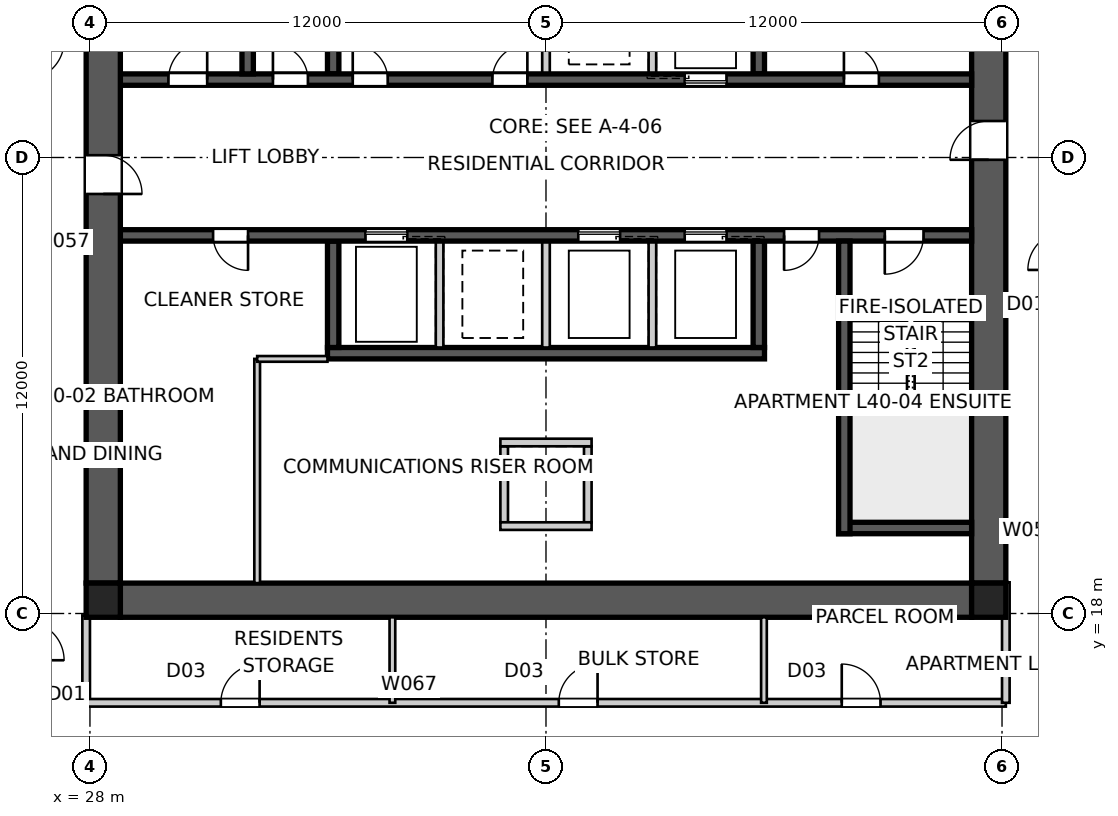
"""IFC4 building model, lengths in metres.
Left out: names, types, materials, properties, quantities, classifications, styles, units other than length and angle.
Written with IfcOpenShell. Run it as: python <this file> out.ifc"""

import sys

from ifc_helpers import new_model, si_unit, direction, frame, frame_2d, origin, origin_2d, place, context, subcontext, project, spatial, polyline, rectangle, outline, extrude, element, fill, save


model = new_model("IFC4")
c1 = context("Model", 3, precision=1e-05, world=origin(), true_north=direction((0.0, 1.0)))
c2 = subcontext(c1, "Body", "Model", "MODEL_VIEW")
j1 = project(units=[si_unit("LENGTHUNIT", "METRE"), si_unit("PLANEANGLEUNIT", "RADIAN")], contexts=[c1])
p1 = place(None, origin())
s1 = spatial("IfcSite", under=j1, at=p1, CompositionType="ELEMENT")
p2 = place(p1, origin())
s2 = spatial("IfcBuilding", under=s1, at=p2, CompositionType="ELEMENT")
p3 = place(p2, frame((0.0, 0.0, 147.2)))
s3 = spatial("IfcBuildingStorey", under=s2, at=p3, CompositionType="ELEMENT", Elevation=147.2)
p4 = place(p3, frame((51.2, 18.35, 0.0), z_axis=(0.0, 0.0, 1.0), x_axis=(-1.0, 0.0, 0.0)))
e1 = element("IfcWall", 1, at=p4, inside=s3, PredefinedType="SHEAR", context=c2, shape_type="SweptSolid", body=[
    extrude(outline(polyline([(0.0, -0.45), (22.4, -0.45), (22.4, -0.025), (22.85, -0.025), (22.85, 0.025), (22.4, 0.025), (22.4, 0.45), (0.0, 0.45), (0.0, 0.025), (-0.45, 0.025), (-0.45, -0.025), (0.0, -0.025), (0.0, -0.45)])), origin(), (0.0, 0.0, 1.0), 3.4),
])
p5 = place(p3, frame((51.65, 18.8, 0.0), z_axis=(0.0, 0.0, 1.0), x_axis=(0.0, 1.0, 0.0)))
e2 = element("IfcWall", 2, at=p5, inside=s3, PredefinedType="SHEAR", context=c2, shape_type="SweptSolid", body=[
    extrude(outline(polyline([(0.0, -0.45), (22.4, -0.45), (22.4, -0.025), (22.85, -0.025), (22.85, 0.025), (22.4, 0.025), (22.4, 0.45), (0.0, 0.45), (0.0, 0.025), (-0.45, 0.025), (-0.45, -0.025), (0.0, -0.025), (0.0, -0.45)])), origin(), (0.0, 0.0, 1.0), 3.4),
])
p6 = place(p5, frame((11.14, 0.0, 0.0)))
e3 = element("IfcOpeningElement", 3, at=p6, cuts=e2, PredefinedType="OPENING", context=c2, shape_type="SweptSolid", body=[
    extrude(rectangle(XDim=1.02, YDim=2.4, at=frame_2d((0.51, 1.2))), frame((0.0, 0.46, 0.0), z_axis=(0.0, -1.0, 0.0), x_axis=(1.0, 0.0, 0.0)), (0.0, 0.0, 1.0), 0.92),
])
p7 = place(p3, frame((28.35, 41.2, 0.0), z_axis=(0.0, 0.0, 1.0), x_axis=(0.0, -1.0, 0.0)))
e4 = element("IfcWall", 4, at=p7, inside=s3, PredefinedType="SHEAR", context=c2, shape_type="SweptSolid", body=[
    extrude(outline(polyline([(0.0, -0.45), (22.4, -0.45), (22.4, -0.025), (22.85, -0.025), (22.85, 0.025), (22.4, 0.025), (22.4, 0.45), (0.0, 0.45), (0.0, 0.025), (-0.45, 0.025), (-0.45, -0.025), (0.0, -0.025), (0.0, -0.45)])), origin(), (0.0, 0.0, 1.0), 3.4),
])
p8 = place(p7, frame((11.14, 0.0, 0.0)))
e5 = element("IfcOpeningElement", 5, at=p8, cuts=e4, PredefinedType="OPENING", context=c2, shape_type="SweptSolid", body=[
    extrude(rectangle(XDim=1.02, YDim=2.4, at=frame_2d((0.51, 1.2))), frame((0.0, 0.46, 0.0), z_axis=(0.0, -1.0, 0.0), x_axis=(1.0, 0.0, 0.0)), (0.0, 0.0, 1.0), 0.92),
])
p9 = place(p3, frame((28.8, 32.05, 0.0), z_axis=(0.0, 0.0, 1.0), x_axis=(1.0, 0.0, 0.0)))
e6 = element("IfcWall", 6, at=p9, inside=s3, PredefinedType="SHEAR", context=c2, shape_type="SweptSolid", body=[
    extrude(rectangle(XDim=22.4, YDim=0.3, at=frame_2d((11.2, 0.0))), origin(), (0.0, 0.0, 1.0), 3.4),
])
p10 = place(p9, frame((19.04, 0.0, 0.0)))
e7 = element("IfcOpeningElement", 7, at=p10, cuts=e6, PredefinedType="OPENING", context=c2, shape_type="SweptSolid", body=[
    extrude(rectangle(XDim=0.92, YDim=2.1, at=frame_2d((0.46, 1.05))), frame((0.0, 0.16, 0.0), z_axis=(0.0, -1.0, 0.0), x_axis=(1.0, 0.0, 0.0)), (0.0, 0.0, 1.0), 0.32),
])
p11 = place(p9, frame((1.265, 0.0, 0.0)))
e8 = element("IfcOpeningElement", 8, at=p11, cuts=e6, PredefinedType="OPENING", context=c2, shape_type="SweptSolid", body=[
    extrude(rectangle(XDim=1.02, YDim=2.1, at=frame_2d((0.51, 1.05))), frame((0.0, 0.16, 0.0), z_axis=(0.0, -1.0, 0.0), x_axis=(1.0, 0.0, 0.0)), (0.0, 0.0, 1.0), 0.32),
])
p12 = place(p9, frame((4.015, 0.0, 0.0)))
e9 = element("IfcOpeningElement", 9, at=p12, cuts=e6, PredefinedType="OPENING", context=c2, shape_type="SweptSolid", body=[
    extrude(rectangle(XDim=0.92, YDim=2.1, at=frame_2d((0.46, 1.05))), frame((0.0, 0.16, 0.0), z_axis=(0.0, -1.0, 0.0), x_axis=(1.0, 0.0, 0.0)), (0.0, 0.0, 1.0), 0.32),
])
p13 = place(p9, frame((6.115, 0.0, 0.0)))
e10 = element("IfcOpeningElement", 10, at=p13, cuts=e6, PredefinedType="OPENING", context=c2, shape_type="SweptSolid", body=[
    extrude(rectangle(XDim=0.92, YDim=2.1, at=frame_2d((0.46, 1.05))), frame((0.0, 0.16, 0.0), z_axis=(0.0, -1.0, 0.0), x_axis=(1.0, 0.0, 0.0)), (0.0, 0.0, 1.0), 0.32),
])
p14 = place(p9, frame((9.79, 0.0, 0.0)))
e11 = element("IfcOpeningElement", 11, at=p14, cuts=e6, PredefinedType="OPENING", context=c2, shape_type="SweptSolid", body=[
    extrude(rectangle(XDim=0.92, YDim=2.1, at=frame_2d((0.46, 1.05))), frame((0.0, 0.16, 0.0), z_axis=(0.0, -1.0, 0.0), x_axis=(1.0, 0.0, 0.0)), (0.0, 0.0, 1.0), 0.32),
])
p15 = place(p9, frame((14.85, 0.0, 0.0)))
e12 = element("IfcOpeningElement", 12, at=p15, cuts=e6, PredefinedType="OPENING", context=c2, shape_type="SweptSolid", body=[
    extrude(rectangle(XDim=1.1, YDim=2.1, at=frame_2d((0.55, 1.05))), frame((0.0, 0.16, 0.0), z_axis=(0.0, -1.0, 0.0), x_axis=(1.0, 0.0, 0.0)), (0.0, 0.0, 1.0), 0.32),
])
p16 = place(p3, frame((51.2, 27.95, 0.0), z_axis=(0.0, 0.0, 1.0), x_axis=(-1.0, 0.0, 0.0)))
e13 = element("IfcWall", 13, at=p16, inside=s3, PredefinedType="SHEAR", context=c2, shape_type="SweptSolid", body=[
    extrude(rectangle(XDim=22.4, YDim=0.3, at=frame_2d((11.2, 0.0))), origin(), (0.0, 0.0, 1.0), 3.4),
])
p17 = place(p16, frame((19.04, 0.0, 0.0)))
e14 = element("IfcOpeningElement", 14, at=p17, cuts=e13, PredefinedType="OPENING", context=c2, shape_type="SweptSolid", body=[
    extrude(rectangle(XDim=0.92, YDim=2.1, at=frame_2d((0.46, 1.05))), frame((0.0, 0.16, 0.0), z_axis=(0.0, -1.0, 0.0), x_axis=(1.0, 0.0, 0.0)), (0.0, 0.0, 1.0), 0.32),
])
p18 = place(p16, frame((1.265, 0.0, 0.0)))
e15 = element("IfcOpeningElement", 15, at=p18, cuts=e13, PredefinedType="OPENING", context=c2, shape_type="SweptSolid", body=[
    extrude(rectangle(XDim=1.02, YDim=2.1, at=frame_2d((0.51, 1.05))), frame((0.0, 0.16, 0.0), z_axis=(0.0, -1.0, 0.0), x_axis=(1.0, 0.0, 0.0)), (0.0, 0.0, 1.0), 0.32),
])
p19 = place(p16, frame((4.015, 0.0, 0.0)))
e16 = element("IfcOpeningElement", 16, at=p19, cuts=e13, PredefinedType="OPENING", context=c2, shape_type="SweptSolid", body=[
    extrude(rectangle(XDim=0.92, YDim=2.1, at=frame_2d((0.46, 1.05))), frame((0.0, 0.16, 0.0), z_axis=(0.0, -1.0, 0.0), x_axis=(1.0, 0.0, 0.0)), (0.0, 0.0, 1.0), 0.32),
])
p20 = place(p16, frame((6.45, 0.0, 0.0)))
e17 = element("IfcOpeningElement", 17, at=p20, cuts=e13, PredefinedType="OPENING", context=c2, shape_type="SweptSolid", body=[
    extrude(rectangle(XDim=1.1, YDim=2.1, at=frame_2d((0.55, 1.05))), frame((0.0, 0.16, 0.0), z_axis=(0.0, -1.0, 0.0), x_axis=(1.0, 0.0, 0.0)), (0.0, 0.0, 1.0), 0.32),
])
p21 = place(p16, frame((9.25, 0.0, 0.0)))
e18 = element("IfcOpeningElement", 18, at=p21, cuts=e13, PredefinedType="OPENING", context=c2, shape_type="SweptSolid", body=[
    extrude(rectangle(XDim=1.1, YDim=2.1, at=frame_2d((0.55, 1.05))), frame((0.0, 0.16, 0.0), z_axis=(0.0, -1.0, 0.0), x_axis=(1.0, 0.0, 0.0)), (0.0, 0.0, 1.0), 0.32),
])
p22 = place(p16, frame((14.85, 0.0, 0.0)))
e19 = element("IfcOpeningElement", 19, at=p22, cuts=e13, PredefinedType="OPENING", context=c2, shape_type="SweptSolid", body=[
    extrude(rectangle(XDim=1.1, YDim=2.1, at=frame_2d((0.55, 1.05))), frame((0.0, 0.16, 0.0), z_axis=(0.0, -1.0, 0.0), x_axis=(1.0, 0.0, 0.0)), (0.0, 0.0, 1.0), 0.32),
])
p23 = place(p3, frame((45.75, 24.85, 0.0), z_axis=(0.0, 0.0, 1.0), x_axis=(-1.0, 0.0, 0.0)))
e20 = element("IfcWall", 20, at=p23, inside=s3, PredefinedType="SHEAR", context=c2, shape_type="SweptSolid", body=[
    extrude(rectangle(XDim=11.5, YDim=0.3, at=frame_2d((5.75, 0.0))), origin(), (0.0, 0.0, 1.0), 3.4),
])
for number, where, z_axis, x_axis in (
    (21, (34.4, 32.2, 0.0), (0.0, 0.0, 1.0), (0.0, 1.0, 0.0)),
    (22, (45.6, 27.8, 0.0), (0.0, 0.0, 1.0), (0.0, -1.0, 0.0)),
):
    element("IfcWall", number, at=place(p3, frame(where, z_axis=z_axis, x_axis=x_axis)), inside=s3, PredefinedType="SHEAR", context=c2, shape_type="SweptSolid", body=[
        extrude(rectangle(XDim=2.8, YDim=0.3, at=frame_2d((1.4, 0.0))), origin(), (0.0, 0.0, 1.0), 3.4),
    ])
for number, where, z_axis, x_axis in (
    (23, (42.8, 27.8, 0.0), (0.0, 0.0, 1.0), (0.0, -1.0, 0.0)),
    (24, (40.0, 32.2, 0.0), (0.0, 0.0, 1.0), (0.0, 1.0, 0.0)),
    (25, (40.0, 27.8, 0.0), (0.0, 0.0, 1.0), (0.0, -1.0, 0.0)),
    (26, (42.8, 32.2, 0.0), (0.0, 0.0, 1.0), (0.0, 1.0, 0.0)),
    (27, (37.2, 27.8, 0.0), (0.0, 0.0, 1.0), (0.0, -1.0, 0.0)),
):
    element("IfcWall", number, at=place(p3, frame(where, z_axis=z_axis, x_axis=x_axis)), inside=s3, PredefinedType="SOLIDWALL", context=c2, shape_type="SweptSolid", body=[
        extrude(rectangle(XDim=2.8, YDim=0.2, at=frame_2d((1.4, 0.0))), origin(), (0.0, 0.0, 1.0), 3.4),
    ])
for number, where, z_axis, x_axis in (
    (28, (45.6, 32.2, 0.0), (0.0, 0.0, 1.0), (0.0, 1.0, 0.0)),
    (29, (34.4, 27.8, 0.0), (0.0, 0.0, 1.0), (0.0, -1.0, 0.0)),
):
    element("IfcWall", number, at=place(p3, frame(where, z_axis=z_axis, x_axis=x_axis)), inside=s3, PredefinedType="SHEAR", context=c2, shape_type="SweptSolid", body=[
        extrude(rectangle(XDim=2.8, YDim=0.3, at=frame_2d((1.4, 0.0))), origin(), (0.0, 0.0, 1.0), 3.4),
    ])
for number, where, z_axis, x_axis in (
    (30, (32.15, 32.2, 0.0), (0.0, 0.0, 1.0), (0.0, 1.0, 0.0)),
    (31, (47.85, 27.8, 0.0), (0.0, 0.0, 1.0), (0.0, -1.0, 0.0)),
):
    element("IfcWall", number, at=place(p3, frame(where, z_axis=z_axis, x_axis=x_axis)), inside=s3, PredefinedType="SHEAR", context=c2, shape_type="SweptSolid", body=[
        extrude(rectangle(XDim=7.7, YDim=0.3, at=frame_2d((3.85, 0.0))), origin(), (0.0, 0.0, 1.0), 3.4),
    ])
p24 = place(p3, frame((51.2, 20.25, 0.0), z_axis=(0.0, 0.0, 1.0), x_axis=(-1.0, 0.0, 0.0)))
e32 = element("IfcWall", 32, at=p24, inside=s3, PredefinedType="SHEAR", context=c2, shape_type="SweptSolid", body=[
    extrude(rectangle(XDim=3.5, YDim=0.3, at=frame_2d((1.75, 0.0))), origin(), (0.0, 0.0, 1.0), 3.4),
])
for number, where, z_axis, x_axis in (
    (33, (38.9, 22.4, 0.0), (0.0, 0.0, 1.0), (0.0, -1.0, 0.0)),
    (34, (41.1, 22.4, 0.0), (0.0, 0.0, 1.0), (0.0, -1.0, 0.0)),
):
    element("IfcWall", number, at=place(p3, frame(where, z_axis=z_axis, x_axis=x_axis)), inside=s3, PredefinedType="SOLIDWALL", context=c2, shape_type="SweptSolid", body=[
        extrude(rectangle(XDim=2.0, YDim=0.2, at=frame_2d((1.0, 0.0))), origin(), (0.0, 0.0, 1.0), 3.4),
    ])
for number, where, z_axis, x_axis in (
    (35, (38.8, 22.5, 0.0), (0.0, 0.0, 1.0), (1.0, 0.0, 0.0)),
    (36, (38.8, 20.3, 0.0), (0.0, 0.0, 1.0), (1.0, 0.0, 0.0)),
):
    element("IfcWall", number, at=place(p3, frame(where, z_axis=z_axis, x_axis=x_axis)), inside=s3, PredefinedType="SOLIDWALL", context=c2, shape_type="SweptSolid", body=[
        extrude(rectangle(XDim=2.4, YDim=0.2, at=frame_2d((1.2, 0.0))), origin(), (0.0, 0.0, 1.0), 3.4),
    ])
for number, where, z_axis, x_axis in (
    (37, (28.35, 18.35, 0.0), (0.0, 0.0, 1.0), (1.0, 0.0, 0.0)),
    (38, (51.65, 18.35, 0.0), (0.0, 0.0, 1.0), (1.0, 0.0, 0.0)),
):
    element("IfcColumn", number, at=place(p3, frame(where, z_axis=z_axis, x_axis=x_axis)), inside=s3, PredefinedType="COLUMN", context=c2, shape_type="SweptSolid", body=[
        extrude(rectangle(XDim=0.9, YDim=0.9, at=origin_2d()), origin(), (0.0, 0.0, 1.0), 3.4),
    ])
p25 = place(p3, frame((32.4, 18.8, 0.0), z_axis=(0.0, 0.0, 1.0), x_axis=(0.0, 1.0, 0.0)))
e39 = element("IfcWall", 39, at=p25, inside=s3, PredefinedType="SOLIDWALL", context=c2, shape_type="SweptSolid", body=[
    extrude(rectangle(XDim=5.9, YDim=0.15, at=frame_2d((2.95, 0.0))), origin(), (0.0, 0.0, 1.0), 3.25),
])
p26 = place(p3, frame((32.4, 24.7, 0.0), z_axis=(0.0, 0.0, 1.0), x_axis=(1.0, 0.0, 0.0)))
e40 = element("IfcWall", 40, at=p26, inside=s3, PredefinedType="SOLIDWALL", context=c2, shape_type="SweptSolid", body=[
    extrude(rectangle(XDim=1.85, YDim=0.15, at=frame_2d((0.925, 0.0))), origin(), (0.0, 0.0, 1.0), 3.25),
])
p27 = place(p3, frame((27.9, 17.95, 0.0), z_axis=(0.0, 0.0, 1.0), x_axis=(0.0, -1.0, 0.0)))
e41 = element("IfcWall", 41, at=p27, inside=s3, PredefinedType="PARTITIONING", context=c2, shape_type="SweptSolid", body=[
    extrude(rectangle(XDim=2.3, YDim=0.2, at=frame_2d((1.15, 0.0))), origin(), (0.0, 0.0, 1.0), 3.25),
])
p28 = place(p3, frame((27.9, 15.65, 0.0), z_axis=(0.0, 0.0, 1.0), x_axis=(1.0, 0.0, 0.0)))
e42 = element("IfcWall", 42, at=p28, inside=s3, PredefinedType="PARTITIONING", context=c2, shape_type="SweptSolid", body=[
    extrude(rectangle(XDim=24.2, YDim=0.2, at=frame_2d((12.1, 0.0))), origin(), (0.0, 0.0, 1.0), 3.25),
])
p29 = place(p28, frame((12.437, 0.0, 0.0)))
e43 = element("IfcOpeningElement", 43, at=p29, cuts=e42, PredefinedType="OPENING", context=c2, shape_type="SweptSolid", body=[
    extrude(rectangle(XDim=1.02, YDim=2.1, at=frame_2d((0.51, 1.05))), frame((0.0, 0.11, 0.0), z_axis=(0.0, -1.0, 0.0), x_axis=(1.0, 0.0, 0.0)), (0.0, 0.0, 1.0), 0.22),
])
p30 = place(p28, frame((3.544, 0.0, 0.0)))
e44 = element("IfcOpeningElement", 44, at=p30, cuts=e42, PredefinedType="OPENING", context=c2, shape_type="SweptSolid", body=[
    extrude(rectangle(XDim=1.02, YDim=2.1, at=frame_2d((0.51, 1.05))), frame((0.0, 0.11, 0.0), z_axis=(0.0, -1.0, 0.0), x_axis=(1.0, 0.0, 0.0)), (0.0, 0.0, 1.0), 0.22),
])
p31 = place(p28, frame((19.883, 0.0, 0.0)))
e45 = element("IfcOpeningElement", 45, at=p31, cuts=e42, PredefinedType="OPENING", context=c2, shape_type="SweptSolid", body=[
    extrude(rectangle(XDim=1.02, YDim=2.1, at=frame_2d((0.51, 1.05))), frame((0.0, 0.11, 0.0), z_axis=(0.0, -1.0, 0.0), x_axis=(1.0, 0.0, 0.0)), (0.0, 0.0, 1.0), 0.22),
])
p32 = place(p3, frame((52.1, 15.65, 0.0), z_axis=(0.0, 0.0, 1.0), x_axis=(0.0, 1.0, 0.0)))
e46 = element("IfcWall", 46, at=p32, inside=s3, PredefinedType="PARTITIONING", context=c2, shape_type="SweptSolid", body=[
    extrude(rectangle(XDim=3.17, YDim=0.2, at=frame_2d((1.585, 0.0))), origin(), (0.0, 0.0, 1.0), 3.25),
])
p33 = place(p3, frame((35.958, 15.65, 0.0), z_axis=(0.0, 0.0, 1.0), x_axis=(0.0, 1.0, 0.0)))
e47 = element("IfcWall", 47, at=p33, inside=s3, PredefinedType="SOLIDWALL", context=c2, shape_type="SweptSolid", body=[
    extrude(rectangle(XDim=2.25, YDim=0.15, at=frame_2d((1.125, 0.0))), origin(), (0.0, 0.0, 1.0), 3.25),
])
p34 = place(p3, frame((45.735, 15.65, 0.0), z_axis=(0.0, 0.0, 1.0), x_axis=(0.0, 1.0, 0.0)))
e48 = element("IfcWall", 48, at=p34, inside=s3, PredefinedType="SOLIDWALL", context=c2, shape_type="SweptSolid", body=[
    extrude(rectangle(XDim=2.25, YDim=0.15, at=frame_2d((1.125, 0.0))), origin(), (0.0, 0.0, 1.0), 2.796),
])
p35 = place(p10, origin())
e49 = element("IfcDoor", 49, at=p35, inside=s3, OperationType="SINGLE_SWING_LEFT", PredefinedType="DOOR", context=c2, shape_type="SweptSolid", body=[
    extrude(rectangle(XDim=0.92, YDim=2.1, at=frame_2d((0.46, 1.05))), frame((0.0, 0.025, 0.0), z_axis=(0.0, -1.0, 0.0), x_axis=(1.0, 0.0, 0.0)), (0.0, 0.0, 1.0), 0.05),
])
fill(e7, e49)
p36 = place(p17, origin())
e50 = element("IfcDoor", 50, at=p36, inside=s3, OperationType="SINGLE_SWING_LEFT", PredefinedType="DOOR", context=c2, shape_type="SweptSolid", body=[
    extrude(rectangle(XDim=0.92, YDim=2.1, at=frame_2d((0.46, 1.05))), frame((0.0, 0.025, 0.0), z_axis=(0.0, -1.0, 0.0), x_axis=(1.0, 0.0, 0.0)), (0.0, 0.0, 1.0), 0.05),
])
fill(e14, e50)
p37 = place(p18, origin())
e51 = element("IfcDoor", 51, at=p37, inside=s3, OperationType="SINGLE_SWING_RIGHT", PredefinedType="DOOR", context=c2, shape_type="SweptSolid", body=[
    extrude(rectangle(XDim=1.02, YDim=2.1, at=frame_2d((0.51, 1.05))), frame((0.0, 0.025, 0.0), z_axis=(0.0, -1.0, 0.0), x_axis=(1.0, 0.0, 0.0)), (0.0, 0.0, 1.0), 0.05),
])
fill(e15, e51)
p38 = place(p11, origin())
e52 = element("IfcDoor", 52, at=p38, inside=s3, OperationType="SINGLE_SWING_RIGHT", PredefinedType="DOOR", context=c2, shape_type="SweptSolid", body=[
    extrude(rectangle(XDim=1.02, YDim=2.1, at=frame_2d((0.51, 1.05))), frame((0.0, 0.025, 0.0), z_axis=(0.0, -1.0, 0.0), x_axis=(1.0, 0.0, 0.0)), (0.0, 0.0, 1.0), 0.05),
])
fill(e8, e52)
p39 = place(p12, origin())
e53 = element("IfcDoor", 53, at=p39, inside=s3, OperationType="SINGLE_SWING_LEFT", PredefinedType="DOOR", context=c2, shape_type="SweptSolid", body=[
    extrude(rectangle(XDim=0.92, YDim=2.1, at=frame_2d((0.46, 1.05))), frame((0.0, 0.025, 0.0), z_axis=(0.0, -1.0, 0.0), x_axis=(1.0, 0.0, 0.0)), (0.0, 0.0, 1.0), 0.05),
])
fill(e9, e53)
p40 = place(p19, origin())
e54 = element("IfcDoor", 54, at=p40, inside=s3, OperationType="SINGLE_SWING_RIGHT", PredefinedType="DOOR", context=c2, shape_type="SweptSolid", body=[
    extrude(rectangle(XDim=0.92, YDim=2.1, at=frame_2d((0.46, 1.05))), frame((0.0, 0.025, 0.0), z_axis=(0.0, -1.0, 0.0), x_axis=(1.0, 0.0, 0.0)), (0.0, 0.0, 1.0), 0.05),
])
fill(e16, e54)
p41 = place(p29, origin())
e55 = element("IfcDoor", 55, at=p41, inside=s3, OperationType="SINGLE_SWING_RIGHT", PredefinedType="DOOR", context=c2, shape_type="SweptSolid", body=[
    extrude(rectangle(XDim=1.02, YDim=2.1, at=frame_2d((0.51, 1.05))), frame((0.0, 0.025, 0.0), z_axis=(0.0, -1.0, 0.0), x_axis=(1.0, 0.0, 0.0)), (0.0, 0.0, 1.0), 0.05),
])
fill(e43, e55)
p42 = place(p30, origin())
e56 = element("IfcDoor", 56, at=p42, inside=s3, OperationType="SINGLE_SWING_RIGHT", PredefinedType="DOOR", context=c2, shape_type="SweptSolid", body=[
    extrude(rectangle(XDim=1.02, YDim=2.1, at=frame_2d((0.51, 1.05))), frame((0.0, 0.025, 0.0), z_axis=(0.0, -1.0, 0.0), x_axis=(1.0, 0.0, 0.0)), (0.0, 0.0, 1.0), 0.05),
])
fill(e44, e56)
p43 = place(p31, origin())
e57 = element("IfcDoor", 57, at=p43, inside=s3, OperationType="SINGLE_SWING_LEFT", PredefinedType="DOOR", context=c2, shape_type="SweptSolid", body=[
    extrude(rectangle(XDim=1.02, YDim=2.1, at=frame_2d((0.51, 1.05))), frame((0.0, 0.025, 0.0), z_axis=(0.0, -1.0, 0.0), x_axis=(1.0, 0.0, 0.0)), (0.0, 0.0, 1.0), 0.05),
])
fill(e45, e57)
p44 = place(p13, origin())
e58 = element("IfcDoor", 58, at=p44, inside=s3, OperationType="SINGLE_SWING_LEFT", PredefinedType="DOOR", context=c2, shape_type="SweptSolid", body=[
    extrude(rectangle(XDim=0.92, YDim=2.1, at=frame_2d((0.46, 1.05))), frame((0.0, 0.025, 0.0), z_axis=(0.0, -1.0, 0.0), x_axis=(1.0, 0.0, 0.0)), (0.0, 0.0, 1.0), 0.05),
])
fill(e10, e58)
p45 = place(p14, origin())
e59 = element("IfcDoor", 59, at=p45, inside=s3, OperationType="SINGLE_SWING_RIGHT", PredefinedType="DOOR", context=c2, shape_type="SweptSolid", body=[
    extrude(rectangle(XDim=0.92, YDim=2.1, at=frame_2d((0.46, 1.05))), frame((0.0, 0.025, 0.0), z_axis=(0.0, -1.0, 0.0), x_axis=(1.0, 0.0, 0.0)), (0.0, 0.0, 1.0), 0.05),
])
fill(e11, e59)
p46 = place(p6, origin())
e60 = element("IfcDoor", 60, at=p46, inside=s3, OperationType="SINGLE_SWING_LEFT", PredefinedType="DOOR", context=c2, shape_type="SweptSolid", body=[
    extrude(rectangle(XDim=1.02, YDim=2.4, at=frame_2d((0.51, 1.2))), frame((0.0, 0.025, 0.0), z_axis=(0.0, -1.0, 0.0), x_axis=(1.0, 0.0, 0.0)), (0.0, 0.0, 1.0), 0.05),
])
fill(e3, e60)
p47 = place(p8, origin())
e61 = element("IfcDoor", 61, at=p47, inside=s3, OperationType="SINGLE_SWING_RIGHT", PredefinedType="DOOR", context=c2, shape_type="SweptSolid", body=[
    extrude(rectangle(XDim=1.02, YDim=2.4, at=frame_2d((0.51, 1.2))), frame((0.0, 0.025, 0.0), z_axis=(0.0, -1.0, 0.0), x_axis=(1.0, 0.0, 0.0)), (0.0, 0.0, 1.0), 0.05),
])
fill(e5, e61)
p48 = place(p20, origin())
e62 = element("IfcDoor", 62, at=p48, inside=s3, OperationType="SLIDING_TO_LEFT", PredefinedType="DOOR", context=c2, shape_type="SweptSolid", body=[
    extrude(rectangle(XDim=1.1, YDim=2.1, at=frame_2d((0.55, 1.05))), frame((0.0, 0.025, 0.0), z_axis=(0.0, -1.0, 0.0), x_axis=(1.0, 0.0, 0.0)), (0.0, 0.0, 1.0), 0.05),
])
fill(e17, e62)
p49 = place(p21, origin())
e63 = element("IfcDoor", 63, at=p49, inside=s3, OperationType="SLIDING_TO_LEFT", PredefinedType="DOOR", context=c2, shape_type="SweptSolid", body=[
    extrude(rectangle(XDim=1.1, YDim=2.1, at=frame_2d((0.55, 1.05))), frame((0.0, 0.025, 0.0), z_axis=(0.0, -1.0, 0.0), x_axis=(1.0, 0.0, 0.0)), (0.0, 0.0, 1.0), 0.05),
])
fill(e18, e63)
p50 = place(p15, origin())
e64 = element("IfcDoor", 64, at=p50, inside=s3, OperationType="SLIDING_TO_LEFT", PredefinedType="DOOR", context=c2, shape_type="SweptSolid", body=[
    extrude(rectangle(XDim=1.1, YDim=2.1, at=frame_2d((0.55, 1.05))), frame((0.0, 0.025, 0.0), z_axis=(0.0, -1.0, 0.0), x_axis=(1.0, 0.0, 0.0)), (0.0, 0.0, 1.0), 0.05),
])
fill(e12, e64)
p51 = place(p22, origin())
e65 = element("IfcDoor", 65, at=p51, inside=s3, OperationType="SLIDING_TO_LEFT", PredefinedType="DOOR", context=c2, shape_type="SweptSolid", body=[
    extrude(rectangle(XDim=1.1, YDim=2.1, at=frame_2d((0.55, 1.05))), frame((0.0, 0.025, 0.0), z_axis=(0.0, -1.0, 0.0), x_axis=(1.0, 0.0, 0.0)), (0.0, 0.0, 1.0), 0.05),
])
fill(e19, e65)
save(model, sys.argv[1])
